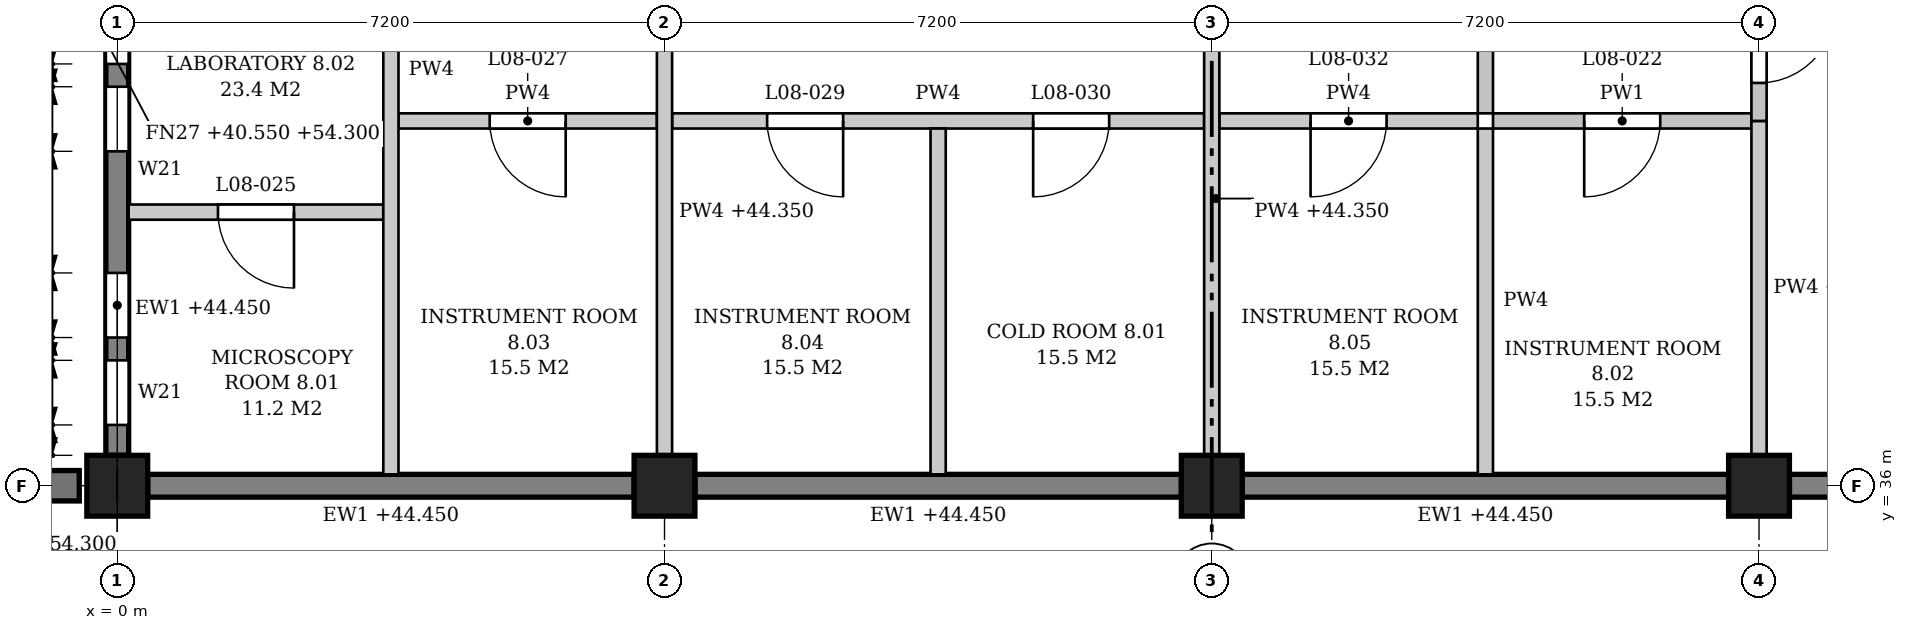
"""IFC4 building model, lengths in metres.
Left out: names, types, materials, properties, quantities, classifications, styles, units other than length and angle.
Written with IfcOpenShell. Run it as: python <this file> out.ifc"""

import sys

from ifc_helpers import new_model, si_unit, direction, frame, frame_2d, origin, origin_2d, place, context, subcontext, project, spatial, polyline, rectangle, outline, extrude, element, fill, save


model = new_model("IFC4")
c1 = context("Model", 3, precision=1e-05, world=origin(), true_north=direction((0.0, 1.0)))
c2 = subcontext(c1, "Body", "Model", "MODEL_VIEW")
j1 = project(units=[si_unit("LENGTHUNIT", "METRE"), si_unit("PLANEANGLEUNIT", "RADIAN")], contexts=[c1])
p1 = place(None, origin())
s1 = spatial("IfcSite", under=j1, at=p1, CompositionType="ELEMENT")
p2 = place(p1, origin())
s2 = spatial("IfcBuilding", under=s1, at=p2, CompositionType="ELEMENT")
p3 = place(p2, frame((0.0, 0.0, 40.8)))
s3 = spatial("IfcBuildingStorey", under=s2, at=p3, CompositionType="ELEMENT", Elevation=40.8)
for number, where, z_axis, x_axis in (
    (1, (0.0, 36.0, 0.0), (0.0, 0.0, 1.0), (1.0, 0.0, 0.0)),
    (2, (7.2, 36.0, 0.0), (0.0, 0.0, 1.0), (1.0, 0.0, 0.0)),
    (3, (14.4, 36.0, 0.0), (0.0, 0.0, 1.0), (1.0, 0.0, 0.0)),
    (4, (21.6, 36.0, 0.0), (0.0, 0.0, 1.0), (1.0, 0.0, 0.0)),
):
    element("IfcColumn", number, at=place(p3, frame(where, z_axis=z_axis, x_axis=x_axis)), inside=s3, PredefinedType="COLUMN", context=c2, shape_type="SweptSolid", body=[
        extrude(rectangle(XDim=0.8, YDim=0.8, at=origin_2d()), origin(), (0.0, 0.0, 1.0), 4.5),
    ])
p4 = place(p3, frame((0.0, 36.4, 0.0), z_axis=(0.0, 0.0, 1.0), x_axis=(0.0, 1.0, 0.0)))
e5 = element("IfcWall", 5, at=p4, inside=s3, PredefinedType="STANDARD", context=c2, shape_type="SweptSolid", body=[
    extrude(rectangle(XDim=6.4, YDim=0.3, at=frame_2d((3.2, 0.0))), origin(), (0.0, 0.0, 1.0), 3.65),
])
p5 = place(p4, frame((0.4, 0.0, 0.9)))
e6 = element("IfcOpeningElement", 6, at=p5, cuts=e5, PredefinedType="OPENING", context=c2, shape_type="SweptSolid", body=[
    extrude(outline(polyline([(0.0, 0.0), (0.85, 0.0), (0.85, 2.25), (0.425, 2.7), (0.0, 2.25), (0.0, 0.0)])), frame((0.0, 0.16, 0.0), z_axis=(0.0, -1.0, 0.0), x_axis=(1.0, 0.0, 0.0)), (0.0, 0.0, 1.0), 0.32),
])
p6 = place(p4, frame((1.55, 0.0, 0.9)))
e7 = element("IfcOpeningElement", 7, at=p6, cuts=e5, PredefinedType="OPENING", context=c2, shape_type="SweptSolid", body=[
    extrude(outline(polyline([(0.0, 0.0), (0.85, 0.0), (0.85, 2.25), (0.425, 2.7), (0.0, 2.25), (0.0, 0.0)])), frame((0.0, 0.16, 0.0), z_axis=(0.0, -1.0, 0.0), x_axis=(1.0, 0.0, 0.0)), (0.0, 0.0, 1.0), 0.32),
])
p7 = place(p4, frame((4.0, 0.0, 0.9)))
e8 = element("IfcOpeningElement", 8, at=p7, cuts=e5, PredefinedType="OPENING", context=c2, shape_type="SweptSolid", body=[
    extrude(outline(polyline([(0.0, 0.0), (0.85, 0.0), (0.85, 2.25), (0.425, 2.7), (0.0, 2.25), (0.0, 0.0)])), frame((0.0, 0.16, 0.0), z_axis=(0.0, -1.0, 0.0), x_axis=(1.0, 0.0, 0.0)), (0.0, 0.0, 1.0), 0.32),
])
p8 = place(p4, frame((5.15, 0.0, 0.9)))
e9 = element("IfcOpeningElement", 9, at=p8, cuts=e5, PredefinedType="OPENING", context=c2, shape_type="SweptSolid", body=[
    extrude(outline(polyline([(0.0, 0.0), (0.85, 0.0), (0.85, 2.25), (0.425, 2.7), (0.0, 2.25), (0.0, 0.0)])), frame((0.0, 0.16, 0.0), z_axis=(0.0, -1.0, 0.0), x_axis=(1.0, 0.0, 0.0)), (0.0, 0.0, 1.0), 0.32),
])
p9 = place(p3, frame((0.4, 36.0, 0.0), z_axis=(0.0, 0.0, 1.0), x_axis=(1.0, 0.0, 0.0)))
e10 = element("IfcWall", 10, at=p9, inside=s3, PredefinedType="STANDARD", context=c2, shape_type="SweptSolid", body=[
    extrude(rectangle(XDim=6.4, YDim=0.3, at=frame_2d((3.2, 0.0))), origin(), (0.0, 0.0, 1.0), 3.65),
])
for number, where, z_axis, x_axis in (
    (11, (7.6, 36.0, 0.0), (0.0, 0.0, 1.0), (1.0, 0.0, 0.0)),
    (12, (14.8, 36.0, 0.0), (0.0, 0.0, 1.0), (1.0, 0.0, 0.0)),
    (13, (22.0, 36.0, 0.0), (0.0, 0.0, 1.0), (1.0, 0.0, 0.0)),
):
    element("IfcWall", number, at=place(p3, frame(where, z_axis=z_axis, x_axis=x_axis)), inside=s3, PredefinedType="STANDARD", context=c2, shape_type="SweptSolid", body=[
        extrude(rectangle(XDim=6.4, YDim=0.3, at=frame_2d((3.2, 0.0))), origin(), (0.0, 0.0, 1.0), 3.65),
    ])
p10 = place(p3, frame((-0.5, 36.0, -0.25), z_axis=(0.0, 0.0, 1.0), x_axis=(-1.0, 0.0, 0.0)))
e14 = element("IfcWall", 14, at=p10, inside=s3, PredefinedType="POLYGONAL", context=c2, shape_type="SweptSolid", body=[
    extrude(outline(polyline([(0.55, 0.0), (0.55, 13.15), (0.15, 13.75), (0.0, 13.75), (0.0, 0.0), (0.55, 0.0)])), frame((0.0, 0.2, 0.0), z_axis=(0.0, -1.0, 0.0), x_axis=(1.0, 0.0, 0.0)), (0.0, 0.0, 1.0), 0.4),
])
p11 = place(p3, frame((0.15, 39.6, 0.0), z_axis=(0.0, 0.0, 1.0), x_axis=(1.0, 0.0, 0.0)))
e15 = element("IfcWall", 15, at=p11, inside=s3, PredefinedType="PARTITIONING", context=c2, shape_type="SweptSolid", body=[
    extrude(outline(polyline([(0.0, 0.0), (3.35, 0.0), (3.35, 4.25), (0.05, 4.25), (0.05, 3.65), (0.0, 3.65), (0.0, 0.0)])), frame((0.0, 0.1, 0.0), z_axis=(0.0, -1.0, 0.0), x_axis=(1.0, 0.0, 0.0)), (0.0, 0.0, 1.0), 0.2),
])
p12 = place(p11, frame((1.175, 0.0, 0.0)))
e16 = element("IfcOpeningElement", 16, at=p12, cuts=e15, PredefinedType="OPENING", context=c2, shape_type="SweptSolid", body=[
    extrude(rectangle(XDim=1.0, YDim=2.1, at=frame_2d((0.5, 1.05))), frame((0.0, 0.11, 0.0), z_axis=(0.0, -1.0, 0.0), x_axis=(1.0, 0.0, 0.0)), (0.0, 0.0, 1.0), 0.22),
])
p13 = place(p3, frame((3.7, 40.8, 0.0), z_axis=(0.0, 0.0, 1.0), x_axis=(1.0, 0.0, 0.0)))
e17 = element("IfcWall", 17, at=p13, inside=s3, PredefinedType="PARTITIONING", context=c2, shape_type="SweptSolid", body=[
    extrude(outline(polyline([(0.0, 0.0), (3.4, 0.0), (3.4, 3.55), (3.275, 3.55), (3.275, 4.25), (0.0, 4.25), (0.0, 0.0)])), frame((0.0, 0.1, 0.0), z_axis=(0.0, -1.0, 0.0), x_axis=(1.0, 0.0, 0.0)), (0.0, 0.0, 1.0), 0.2),
])
p14 = place(p13, frame((1.2, 0.0, 0.0)))
e18 = element("IfcOpeningElement", 18, at=p14, cuts=e17, PredefinedType="OPENING", context=c2, shape_type="SweptSolid", body=[
    extrude(rectangle(XDim=1.0, YDim=2.1, at=frame_2d((0.5, 1.05))), frame((0.0, 0.11, 0.0), z_axis=(0.0, -1.0, 0.0), x_axis=(1.0, 0.0, 0.0)), (0.0, 0.0, 1.0), 0.22),
])
p15 = place(p3, frame((7.3, 40.8, 0.0), z_axis=(0.0, 0.0, 1.0), x_axis=(1.0, 0.0, 0.0)))
e19 = element("IfcWall", 19, at=p15, inside=s3, PredefinedType="PARTITIONING", context=c2, shape_type="SweptSolid", body=[
    extrude(outline(polyline([(0.0, 0.0), (7.0, 0.0), (7.0, 3.55), (6.875, 3.55), (6.875, 4.25), (0.125, 4.25), (0.125, 3.55), (0.0, 3.55), (0.0, 0.0)])), frame((0.0, 0.1, 0.0), z_axis=(0.0, -1.0, 0.0), x_axis=(1.0, 0.0, 0.0)), (0.0, 0.0, 1.0), 0.2),
])
p16 = place(p15, frame((1.25, 0.0, 0.0)))
e20 = element("IfcOpeningElement", 20, at=p16, cuts=e19, PredefinedType="OPENING", context=c2, shape_type="SweptSolid", body=[
    extrude(rectangle(XDim=1.0, YDim=2.1, at=frame_2d((0.5, 1.05))), frame((0.0, 0.11, 0.0), z_axis=(0.0, -1.0, 0.0), x_axis=(1.0, 0.0, 0.0)), (0.0, 0.0, 1.0), 0.22),
])
p17 = place(p15, frame((4.75, 0.0, 0.0)))
e21 = element("IfcOpeningElement", 21, at=p17, cuts=e19, PredefinedType="OPENING", context=c2, shape_type="SweptSolid", body=[
    extrude(rectangle(XDim=1.0, YDim=2.1, at=frame_2d((0.5, 1.05))), frame((0.0, 0.11, 0.0), z_axis=(0.0, -1.0, 0.0), x_axis=(1.0, 0.0, 0.0)), (0.0, 0.0, 1.0), 0.22),
])
p18 = place(p3, frame((14.5, 40.8, 0.0), z_axis=(0.0, 0.0, 1.0), x_axis=(1.0, 0.0, 0.0)))
e22 = element("IfcWall", 22, at=p18, inside=s3, PredefinedType="PARTITIONING", context=c2, shape_type="SweptSolid", body=[
    extrude(outline(polyline([(0.0, 0.0), (3.4, 0.0), (3.4, 4.25), (0.125, 4.25), (0.125, 3.55), (0.0, 3.55), (0.0, 0.0)])), frame((0.0, 0.1, 0.0), z_axis=(0.0, -1.0, 0.0), x_axis=(1.0, 0.0, 0.0)), (0.0, 0.0, 1.0), 0.2),
])
p19 = place(p18, frame((1.2, 0.0, 0.0)))
e23 = element("IfcOpeningElement", 23, at=p19, cuts=e22, PredefinedType="OPENING", context=c2, shape_type="SweptSolid", body=[
    extrude(rectangle(XDim=1.0, YDim=2.1, at=frame_2d((0.5, 1.05))), frame((0.0, 0.11, 0.0), z_axis=(0.0, -1.0, 0.0), x_axis=(1.0, 0.0, 0.0)), (0.0, 0.0, 1.0), 0.22),
])
p20 = place(p3, frame((18.1, 40.8, 0.0), z_axis=(0.0, 0.0, 1.0), x_axis=(1.0, 0.0, 0.0)))
e24 = element("IfcWall", 24, at=p20, inside=s3, PredefinedType="PARTITIONING", context=c2, shape_type="SweptSolid", body=[
    extrude(outline(polyline([(0.0, 0.0), (3.4, 0.0), (3.4, 3.55), (3.275, 3.55), (3.275, 4.25), (0.0, 4.25), (0.0, 0.0)])), frame((0.0, 0.1, 0.0), z_axis=(0.0, -1.0, 0.0), x_axis=(1.0, 0.0, 0.0)), (0.0, 0.0, 1.0), 0.2),
])
p21 = place(p20, frame((1.2, 0.0, 0.0)))
e25 = element("IfcOpeningElement", 25, at=p21, cuts=e24, PredefinedType="OPENING", context=c2, shape_type="SweptSolid", body=[
    extrude(rectangle(XDim=1.0, YDim=2.1, at=frame_2d((0.5, 1.05))), frame((0.0, 0.11, 0.0), z_axis=(0.0, -1.0, 0.0), x_axis=(1.0, 0.0, 0.0)), (0.0, 0.0, 1.0), 0.22),
])
p22 = place(p3, frame((3.6, 36.15, 0.0), z_axis=(0.0, 0.0, 1.0), x_axis=(0.0, 1.0, 0.0)))
e26 = element("IfcWall", 26, at=p22, inside=s3, PredefinedType="PARTITIONING", context=c2, shape_type="SweptSolid", body=[
    extrude(outline(polyline([(0.0, 0.0), (10.65, 0.0), (10.65, 4.25), (7.275, 4.25), (7.275, 3.55), (6.825, 3.55), (6.825, 4.25), (0.05, 4.25), (0.05, 3.65), (0.0, 3.65), (0.0, 0.0)])), frame((0.0, 0.1, 0.0), z_axis=(0.0, -1.0, 0.0), x_axis=(1.0, 0.0, 0.0)), (0.0, 0.0, 1.0), 0.2),
])
p23 = place(p3, frame((7.2, 36.4, 0.0), z_axis=(0.0, 0.0, 1.0), x_axis=(0.0, 1.0, 0.0)))
e27 = element("IfcWall", 27, at=p23, inside=s3, PredefinedType="PARTITIONING", context=c2, shape_type="SweptSolid", body=[
    extrude(rectangle(XDim=6.4, YDim=0.2, at=frame_2d((3.2, 0.0))), origin(), (0.0, 0.0, 1.0), 3.55),
])
p24 = place(p3, frame((10.8, 36.15, 0.0), z_axis=(0.0, 0.0, 1.0), x_axis=(0.0, 1.0, 0.0)))
e28 = element("IfcWall", 28, at=p24, inside=s3, PredefinedType="PARTITIONING", context=c2, shape_type="SweptSolid", body=[
    extrude(outline(polyline([(0.0, 0.0), (4.55, 0.0), (4.55, 4.25), (0.05, 4.25), (0.05, 3.65), (0.0, 3.65), (0.0, 0.0)])), frame((0.0, 0.1, 0.0), z_axis=(0.0, -1.0, 0.0), x_axis=(1.0, 0.0, 0.0)), (0.0, 0.0, 1.0), 0.2),
])
p25 = place(p3, frame((14.4, 36.4, 0.0), z_axis=(0.0, 0.0, 1.0), x_axis=(0.0, 1.0, 0.0)))
e29 = element("IfcWall", 29, at=p25, inside=s3, PredefinedType="PARTITIONING", context=c2, shape_type="SweptSolid", body=[
    extrude(rectangle(XDim=6.4, YDim=0.2, at=frame_2d((3.2, 0.0))), origin(), (0.0, 0.0, 1.0), 3.55),
])
p26 = place(p3, frame((18.0, 36.15, 0.0), z_axis=(0.0, 0.0, 1.0), x_axis=(0.0, 1.0, 0.0)))
e30 = element("IfcWall", 30, at=p26, inside=s3, PredefinedType="PARTITIONING", context=c2, shape_type="SweptSolid", body=[
    extrude(outline(polyline([(0.0, 0.0), (4.55, 0.0), (4.55, 4.25), (0.05, 4.25), (0.05, 3.65), (0.0, 3.65), (0.0, 0.0)])), frame((0.0, 0.1, 0.0), z_axis=(0.0, -1.0, 0.0), x_axis=(1.0, 0.0, 0.0)), (0.0, 0.0, 1.0), 0.2),
])
p27 = place(p3, frame((18.0, 40.9, 0.0), z_axis=(0.0, 0.0, 1.0), x_axis=(0.0, 1.0, 0.0)))
e31 = element("IfcWall", 31, at=p27, inside=s3, PredefinedType="PARTITIONING", context=c2, shape_type="SweptSolid", body=[
    extrude(outline(polyline([(0.0, 0.0), (7.0, 0.0), (7.0, 4.25), (2.525, 4.25), (2.525, 3.55), (2.075, 3.55), (2.075, 4.25), (0.0, 4.25), (0.0, 0.0)])), frame((0.0, 0.1, 0.0), z_axis=(0.0, -1.0, 0.0), x_axis=(1.0, 0.0, 0.0)), (0.0, 0.0, 1.0), 0.2),
])
p28 = place(p27, frame((3.0, 0.0, 0.0)))
e32 = element("IfcOpeningElement", 32, at=p28, cuts=e31, PredefinedType="OPENING", context=c2, shape_type="SweptSolid", body=[
    extrude(rectangle(XDim=1.0, YDim=2.1, at=frame_2d((0.5, 1.05))), frame((0.0, 0.11, 0.0), z_axis=(0.0, -1.0, 0.0), x_axis=(1.0, 0.0, 0.0)), (0.0, 0.0, 1.0), 0.22),
])
p29 = place(p3, frame((21.6, 36.4, 0.0), z_axis=(0.0, 0.0, 1.0), x_axis=(0.0, 1.0, 0.0)))
e33 = element("IfcWall", 33, at=p29, inside=s3, PredefinedType="PARTITIONING", context=c2, shape_type="SweptSolid", body=[
    extrude(rectangle(XDim=4.4, YDim=0.2, at=frame_2d((2.2, 0.0))), origin(), (0.0, 0.0, 1.0), 3.55),
])
p30 = place(p3, frame((21.6, 40.8, 0.0), z_axis=(0.0, 0.0, 1.0), x_axis=(0.0, 1.0, 0.0)))
e34 = element("IfcWall", 34, at=p30, inside=s3, PredefinedType="PARTITIONING", context=c2, shape_type="SweptSolid", body=[
    extrude(rectangle(XDim=2.0, YDim=0.2, at=frame_2d((1.0, 0.0))), origin(), (0.0, 0.0, 1.0), 3.55),
])
p31 = place(p30, frame((0.5, 0.0, 0.0)))
e35 = element("IfcOpeningElement", 35, at=p31, cuts=e34, PredefinedType="OPENING", context=c2, shape_type="SweptSolid", body=[
    extrude(rectangle(XDim=1.0, YDim=2.1, at=frame_2d((0.5, 1.05))), frame((0.0, 0.11, 0.0), z_axis=(0.0, -1.0, 0.0), x_axis=(1.0, 0.0, 0.0)), (0.0, 0.0, 1.0), 0.22),
])
p32 = place(p5, origin())
e36 = element("IfcWindow", 36, at=p32, inside=s3, PartitioningType="SINGLE_PANEL", PredefinedType="WINDOW", context=c2, shape_type="SweptSolid", body=[
    extrude(outline(polyline([(0.0, 0.0), (0.85, 0.0), (0.85, 2.25), (0.425, 2.7), (0.0, 2.25), (0.0, 0.0)])), frame((0.0, 0.03, 0.0), z_axis=(0.0, -1.0, 0.0), x_axis=(1.0, 0.0, 0.0)), (0.0, 0.0, 1.0), 0.06),
])
fill(e6, e36)
p33 = place(p6, origin())
e37 = element("IfcWindow", 37, at=p33, inside=s3, PartitioningType="SINGLE_PANEL", PredefinedType="WINDOW", context=c2, shape_type="SweptSolid", body=[
    extrude(outline(polyline([(0.0, 0.0), (0.85, 0.0), (0.85, 2.25), (0.425, 2.7), (0.0, 2.25), (0.0, 0.0)])), frame((0.0, 0.03, 0.0), z_axis=(0.0, -1.0, 0.0), x_axis=(1.0, 0.0, 0.0)), (0.0, 0.0, 1.0), 0.06),
])
fill(e7, e37)
p34 = place(p7, origin())
e38 = element("IfcWindow", 38, at=p34, inside=s3, PartitioningType="SINGLE_PANEL", PredefinedType="WINDOW", context=c2, shape_type="SweptSolid", body=[
    extrude(outline(polyline([(0.0, 0.0), (0.85, 0.0), (0.85, 2.25), (0.425, 2.7), (0.0, 2.25), (0.0, 0.0)])), frame((0.0, 0.03, 0.0), z_axis=(0.0, -1.0, 0.0), x_axis=(1.0, 0.0, 0.0)), (0.0, 0.0, 1.0), 0.06),
])
fill(e8, e38)
p35 = place(p8, origin())
e39 = element("IfcWindow", 39, at=p35, inside=s3, PartitioningType="SINGLE_PANEL", PredefinedType="WINDOW", context=c2, shape_type="SweptSolid", body=[
    extrude(outline(polyline([(0.0, 0.0), (0.85, 0.0), (0.85, 2.25), (0.425, 2.7), (0.0, 2.25), (0.0, 0.0)])), frame((0.0, 0.03, 0.0), z_axis=(0.0, -1.0, 0.0), x_axis=(1.0, 0.0, 0.0)), (0.0, 0.0, 1.0), 0.06),
])
fill(e9, e39)
p36 = place(p21, frame((1.0, 0.0, 0.0), z_axis=(0.0, 0.0, 1.0), x_axis=(-1.0, 0.0, 0.0)))
e40 = element("IfcDoor", 40, at=p36, inside=s3, OperationType="SINGLE_SWING_RIGHT", PredefinedType="DOOR", context=c2, shape_type="SweptSolid", body=[
    extrude(rectangle(XDim=1.0, YDim=2.1, at=frame_2d((0.5, 1.05))), frame((0.0, 0.025, 0.0), z_axis=(0.0, -1.0, 0.0), x_axis=(1.0, 0.0, 0.0)), (0.0, 0.0, 1.0), 0.05),
])
fill(e25, e40)
p37 = place(p31, frame((1.0, 0.0, 0.0), z_axis=(0.0, 0.0, 1.0), x_axis=(-1.0, 0.0, 0.0)))
e41 = element("IfcDoor", 41, at=p37, inside=s3, OperationType="SINGLE_SWING_LEFT", PredefinedType="DOOR", context=c2, shape_type="SweptSolid", body=[
    extrude(rectangle(XDim=1.0, YDim=2.1, at=frame_2d((0.5, 1.05))), frame((0.0, 0.025, 0.0), z_axis=(0.0, -1.0, 0.0), x_axis=(1.0, 0.0, 0.0)), (0.0, 0.0, 1.0), 0.05),
])
fill(e35, e41)
p38 = place(p12, frame((1.0, 0.0, 0.0), z_axis=(0.0, 0.0, 1.0), x_axis=(-1.0, 0.0, 0.0)))
e42 = element("IfcDoor", 42, at=p38, inside=s3, OperationType="SINGLE_SWING_LEFT", PredefinedType="DOOR", context=c2, shape_type="SweptSolid", body=[
    extrude(rectangle(XDim=1.0, YDim=2.1, at=frame_2d((0.5, 1.05))), frame((0.0, 0.025, 0.0), z_axis=(0.0, -1.0, 0.0), x_axis=(1.0, 0.0, 0.0)), (0.0, 0.0, 1.0), 0.05),
])
fill(e16, e42)
p39 = place(p14, frame((1.0, 0.0, 0.0), z_axis=(0.0, 0.0, 1.0), x_axis=(-1.0, 0.0, 0.0)))
e43 = element("IfcDoor", 43, at=p39, inside=s3, OperationType="SINGLE_SWING_LEFT", PredefinedType="DOOR", context=c2, shape_type="SweptSolid", body=[
    extrude(rectangle(XDim=1.0, YDim=2.1, at=frame_2d((0.5, 1.05))), frame((0.0, 0.025, 0.0), z_axis=(0.0, -1.0, 0.0), x_axis=(1.0, 0.0, 0.0)), (0.0, 0.0, 1.0), 0.05),
])
fill(e18, e43)
p40 = place(p16, frame((1.0, 0.0, 0.0), z_axis=(0.0, 0.0, 1.0), x_axis=(-1.0, 0.0, 0.0)))
e44 = element("IfcDoor", 44, at=p40, inside=s3, OperationType="SINGLE_SWING_LEFT", PredefinedType="DOOR", context=c2, shape_type="SweptSolid", body=[
    extrude(rectangle(XDim=1.0, YDim=2.1, at=frame_2d((0.5, 1.05))), frame((0.0, 0.025, 0.0), z_axis=(0.0, -1.0, 0.0), x_axis=(1.0, 0.0, 0.0)), (0.0, 0.0, 1.0), 0.05),
])
fill(e20, e44)
p41 = place(p17, frame((1.0, 0.0, 0.0), z_axis=(0.0, 0.0, 1.0), x_axis=(-1.0, 0.0, 0.0)))
e45 = element("IfcDoor", 45, at=p41, inside=s3, OperationType="SINGLE_SWING_RIGHT", PredefinedType="DOOR", context=c2, shape_type="SweptSolid", body=[
    extrude(rectangle(XDim=1.0, YDim=2.1, at=frame_2d((0.5, 1.05))), frame((0.0, 0.025, 0.0), z_axis=(0.0, -1.0, 0.0), x_axis=(1.0, 0.0, 0.0)), (0.0, 0.0, 1.0), 0.05),
])
fill(e21, e45)
p42 = place(p19, frame((1.0, 0.0, 0.0), z_axis=(0.0, 0.0, 1.0), x_axis=(-1.0, 0.0, 0.0)))
e46 = element("IfcDoor", 46, at=p42, inside=s3, OperationType="SINGLE_SWING_RIGHT", PredefinedType="DOOR", context=c2, shape_type="SweptSolid", body=[
    extrude(rectangle(XDim=1.0, YDim=2.1, at=frame_2d((0.5, 1.05))), frame((0.0, 0.025, 0.0), z_axis=(0.0, -1.0, 0.0), x_axis=(1.0, 0.0, 0.0)), (0.0, 0.0, 1.0), 0.05),
])
fill(e23, e46)
save(model, sys.argv[1])
